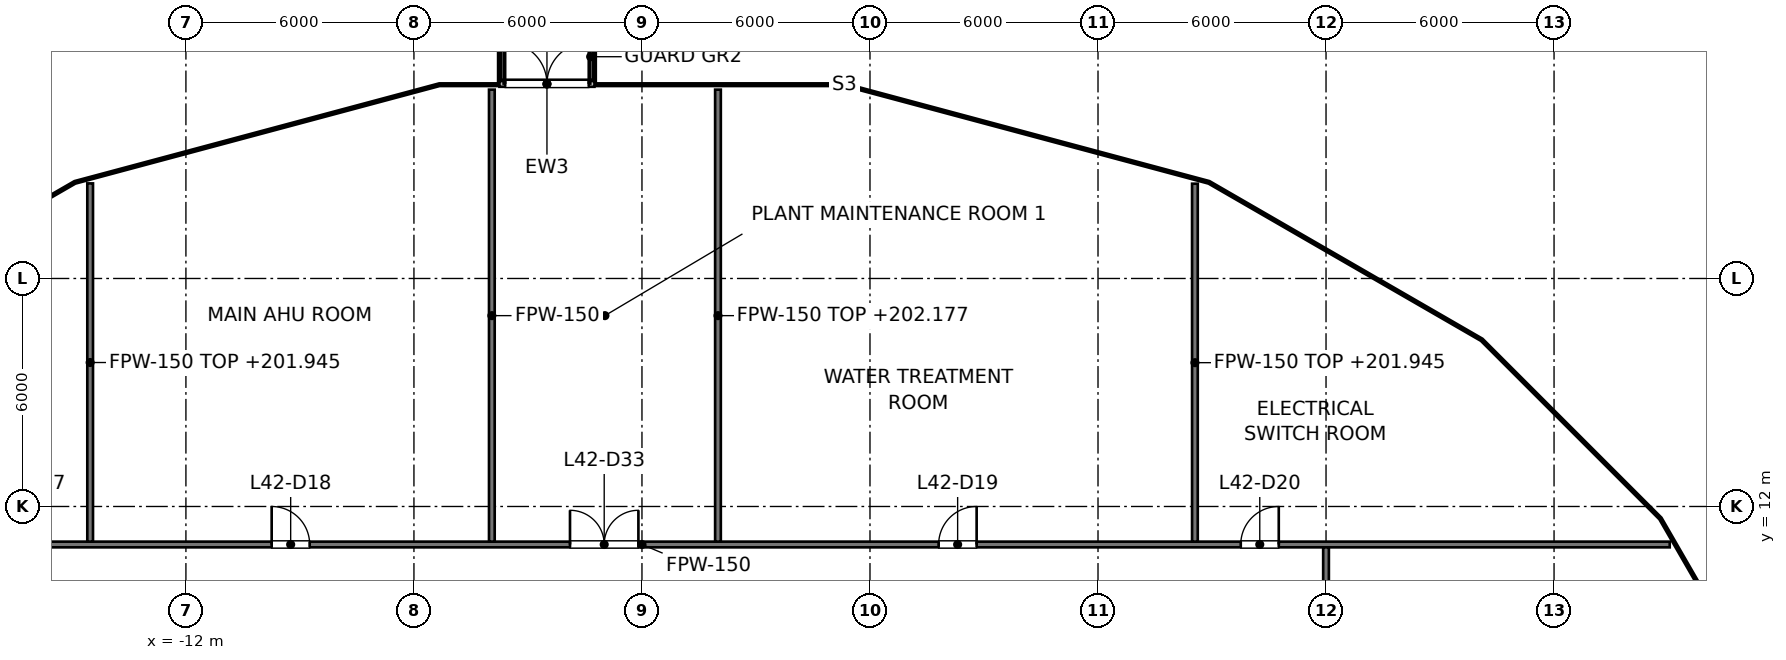
"""IFC4 building model, lengths in metres.
Left out: names, types, materials, properties, quantities, classifications, styles, units other than length and angle.
Written with IfcOpenShell. Run it as: python <this file> out.ifc"""

import sys

from ifc_helpers import new_model, si_unit, direction, frame, frame_2d, origin, place, context, subcontext, project, spatial, rectangle, extrude, element, fill, save


model = new_model("IFC4")
c1 = context("Model", 3, precision=1e-05, world=origin(), true_north=direction((0.0, 1.0)))
c2 = subcontext(c1, "Body", "Model", "MODEL_VIEW")
j1 = project(units=[si_unit("LENGTHUNIT", "METRE"), si_unit("PLANEANGLEUNIT", "RADIAN")], contexts=[c1])
p1 = place(None, origin())
s1 = spatial("IfcSite", under=j1, at=p1, CompositionType="ELEMENT")
p2 = place(p1, origin())
s2 = spatial("IfcBuilding", under=s1, at=p2, CompositionType="ELEMENT")
p3 = place(p2, frame((0.0, 0.0, 197.6)))
s3 = spatial("IfcBuildingStorey", under=s2, at=p3, CompositionType="ELEMENT", Elevation=197.6)
p4 = place(p3, frame((-3.75, 23.119, 0.0), z_axis=(0.0, 0.0, 1.0), x_axis=(1.0, 0.0, 0.0)))
e1 = element("IfcWall", 1, at=p4, inside=s3, PredefinedType="SOLIDWALL", context=c2, shape_type="SweptSolid", body=[
    extrude(rectangle(XDim=2.5, YDim=0.15, at=frame_2d((1.25, 0.0))), origin(), (0.0, 0.0, 1.0), 2.5),
])
p5 = place(p4, frame((0.15, 0.0, 0.0)))
e2 = element("IfcOpeningElement", 2, at=p5, cuts=e1, PredefinedType="OPENING", context=c2, shape_type="SweptSolid", body=[
    extrude(rectangle(XDim=2.2, YDim=2.1, at=frame_2d((1.1, 1.05))), frame((0.0, 0.075, 0.0), z_axis=(0.0, -1.0, 0.0), x_axis=(1.0, 0.0, 0.0)), (0.0, 0.0, 1.0), 0.15),
])
p6 = place(p3, frame((-27.044, 11.0, 0.0), z_axis=(0.0, 0.0, 1.0), x_axis=(1.0, 0.0, 0.0)))
e3 = element("IfcWall", 3, at=p6, inside=s3, PredefinedType="PARTITIONING", context=c2, shape_type="SweptSolid", body=[
    extrude(rectangle(XDim=54.087, YDim=0.15, at=frame_2d((27.044, 0.0))), origin(), (0.0, 0.0, 1.0), 4.277),
])
p7 = place(p6, frame((10.3, 0.0, 0.0)))
e4 = element("IfcOpeningElement", 4, at=p7, cuts=e3, PredefinedType="OPENING", context=c2, shape_type="SweptSolid", body=[
    extrude(rectangle(XDim=1.0, YDim=2.1, at=frame_2d((0.5, 1.05))), frame((0.0, 0.075, 0.0), z_axis=(0.0, -1.0, 0.0), x_axis=(1.0, 0.0, 0.0)), (0.0, 0.0, 1.0), 0.15),
])
p8 = place(p6, frame((17.3, 0.0, 0.0)))
e5 = element("IfcOpeningElement", 5, at=p8, cuts=e3, PredefinedType="OPENING", context=c2, shape_type="SweptSolid", body=[
    extrude(rectangle(XDim=1.0, YDim=2.1, at=frame_2d((0.5, 1.05))), frame((0.0, 0.075, 0.0), z_axis=(0.0, -1.0, 0.0), x_axis=(1.0, 0.0, 0.0)), (0.0, 0.0, 1.0), 0.15),
])
p9 = place(p6, frame((34.85, 0.0, 0.0)))
e6 = element("IfcOpeningElement", 6, at=p9, cuts=e3, PredefinedType="OPENING", context=c2, shape_type="SweptSolid", body=[
    extrude(rectangle(XDim=1.0, YDim=2.1, at=frame_2d((0.5, 1.05))), frame((0.0, 0.075, 0.0), z_axis=(0.0, -1.0, 0.0), x_axis=(1.0, 0.0, 0.0)), (0.0, 0.0, 1.0), 0.15),
])
p10 = place(p6, frame((42.8, 0.0, 0.0)))
e7 = element("IfcOpeningElement", 7, at=p10, cuts=e3, PredefinedType="OPENING", context=c2, shape_type="SweptSolid", body=[
    extrude(rectangle(XDim=1.0, YDim=2.1, at=frame_2d((0.5, 1.05))), frame((0.0, 0.075, 0.0), z_axis=(0.0, -1.0, 0.0), x_axis=(1.0, 0.0, 0.0)), (0.0, 0.0, 1.0), 0.15),
])
p11 = place(p6, frame((25.15, 0.0, 0.0)))
e8 = element("IfcOpeningElement", 8, at=p11, cuts=e3, PredefinedType="OPENING", context=c2, shape_type="SweptSolid", body=[
    extrude(rectangle(XDim=1.8, YDim=2.1, at=frame_2d((0.9, 1.05))), frame((0.0, 0.075, 0.0), z_axis=(0.0, -1.0, 0.0), x_axis=(1.0, 0.0, 0.0)), (0.0, 0.0, 1.0), 0.15),
])
p12 = place(p3, frame((18.0, -10.925, 0.0), z_axis=(0.0, 0.0, 1.0), x_axis=(0.0, 1.0, 0.0)))
e9 = element("IfcWall", 9, at=p12, inside=s3, PredefinedType="PARTITIONING", context=c2, shape_type="SweptSolid", body=[
    extrude(rectangle(XDim=21.85, YDim=0.15, at=frame_2d((10.925, 0.0))), origin(), (0.0, 0.0, 1.0), 4.277),
])
p13 = place(p12, frame((3.45, 0.0, 0.0)))
e10 = element("IfcOpeningElement", 10, at=p13, cuts=e9, PredefinedType="OPENING", context=c2, shape_type="SweptSolid", body=[
    extrude(rectangle(XDim=1.0, YDim=2.1, at=frame_2d((0.5, 1.05))), frame((0.0, 0.075, 0.0), z_axis=(0.0, -1.0, 0.0), x_axis=(1.0, 0.0, 0.0)), (0.0, 0.0, 1.0), 0.15),
])
p14 = place(p12, frame((14.425, 0.0, 0.0)))
e11 = element("IfcOpeningElement", 11, at=p14, cuts=e9, PredefinedType="OPENING", context=c2, shape_type="SweptSolid", body=[
    extrude(rectangle(XDim=1.0, YDim=2.1, at=frame_2d((0.5, 1.05))), frame((0.0, 0.075, 0.0), z_axis=(0.0, -1.0, 0.0), x_axis=(1.0, 0.0, 0.0)), (0.0, 0.0, 1.0), 0.15),
])
p15 = place(p3, frame((-3.95, 11.075, 0.0), z_axis=(0.0, 0.0, 1.0), x_axis=(0.0, 1.0, 0.0)))
e12 = element("IfcWall", 12, at=p15, inside=s3, PredefinedType="PARTITIONING", context=c2, shape_type="SweptSolid", body=[
    extrude(rectangle(XDim=11.894, YDim=0.15, at=frame_2d((5.947, 0.0))), origin(), (0.0, 0.0, 1.0), 4.277),
])
p16 = place(p3, frame((2.0, 11.075, 0.0), z_axis=(0.0, 0.0, 1.0), x_axis=(0.0, 1.0, 0.0)))
e13 = element("IfcWall", 13, at=p16, inside=s3, PredefinedType="PARTITIONING", context=c2, shape_type="SweptSolid", body=[
    extrude(rectangle(XDim=11.894, YDim=0.15, at=frame_2d((5.947, 0.0))), origin(), (0.0, 0.0, 1.0), 4.577),
])
p17 = place(p3, frame((-14.52, 11.075, 0.0), z_axis=(0.0, 0.0, 1.0), x_axis=(0.0, 1.0, 0.0)))
e14 = element("IfcWall", 14, at=p17, inside=s3, PredefinedType="PARTITIONING", context=c2, shape_type="SweptSolid", body=[
    extrude(rectangle(XDim=9.427, YDim=0.15, at=frame_2d((4.714, 0.0))), origin(), (0.0, 0.0, 1.0), 4.345),
])
p18 = place(p3, frame((14.55, 11.075, 0.0), z_axis=(0.0, 0.0, 1.0), x_axis=(0.0, 1.0, 0.0)))
e15 = element("IfcWall", 15, at=p18, inside=s3, PredefinedType="PARTITIONING", context=c2, shape_type="SweptSolid", body=[
    extrude(rectangle(XDim=9.419, YDim=0.15, at=frame_2d((4.709, 0.0))), origin(), (0.0, 0.0, 1.0), 4.345),
])
p19 = place(p5, origin())
e16 = element("IfcDoor", 16, at=p19, inside=s3, OperationType="DOUBLE_DOOR_SINGLE_SWING", PredefinedType="DOOR", context=c2, shape_type="SweptSolid", body=[
    extrude(rectangle(XDim=2.2, YDim=2.1, at=frame_2d((1.1, 1.05))), frame((0.0, 0.025, 0.0), z_axis=(0.0, -1.0, 0.0), x_axis=(1.0, 0.0, 0.0)), (0.0, 0.0, 1.0), 0.05),
])
fill(e2, e16)
p20 = place(p8, origin())
e17 = element("IfcDoor", 17, at=p20, inside=s3, OperationType="SINGLE_SWING_LEFT", PredefinedType="DOOR", context=c2, shape_type="SweptSolid", body=[
    extrude(rectangle(XDim=1.0, YDim=2.1, at=frame_2d((0.5, 1.05))), frame((0.0, 0.025, 0.0), z_axis=(0.0, -1.0, 0.0), x_axis=(1.0, 0.0, 0.0)), (0.0, 0.0, 1.0), 0.05),
])
fill(e5, e17)
p21 = place(p9, origin())
e18 = element("IfcDoor", 18, at=p21, inside=s3, OperationType="SINGLE_SWING_RIGHT", PredefinedType="DOOR", context=c2, shape_type="SweptSolid", body=[
    extrude(rectangle(XDim=1.0, YDim=2.1, at=frame_2d((0.5, 1.05))), frame((0.0, 0.025, 0.0), z_axis=(0.0, -1.0, 0.0), x_axis=(1.0, 0.0, 0.0)), (0.0, 0.0, 1.0), 0.05),
])
fill(e6, e18)
p22 = place(p10, origin())
e19 = element("IfcDoor", 19, at=p22, inside=s3, OperationType="SINGLE_SWING_RIGHT", PredefinedType="DOOR", context=c2, shape_type="SweptSolid", body=[
    extrude(rectangle(XDim=1.0, YDim=2.1, at=frame_2d((0.5, 1.05))), frame((0.0, 0.025, 0.0), z_axis=(0.0, -1.0, 0.0), x_axis=(1.0, 0.0, 0.0)), (0.0, 0.0, 1.0), 0.05),
])
fill(e7, e19)
p23 = place(p11, origin())
e20 = element("IfcDoor", 20, at=p23, inside=s3, OperationType="DOUBLE_DOOR_SINGLE_SWING", PredefinedType="DOOR", context=c2, shape_type="SweptSolid", body=[
    extrude(rectangle(XDim=1.8, YDim=2.1, at=frame_2d((0.9, 1.05))), frame((0.0, 0.025, 0.0), z_axis=(0.0, -1.0, 0.0), x_axis=(1.0, 0.0, 0.0)), (0.0, 0.0, 1.0), 0.05),
])
fill(e8, e20)
save(model, sys.argv[1])
